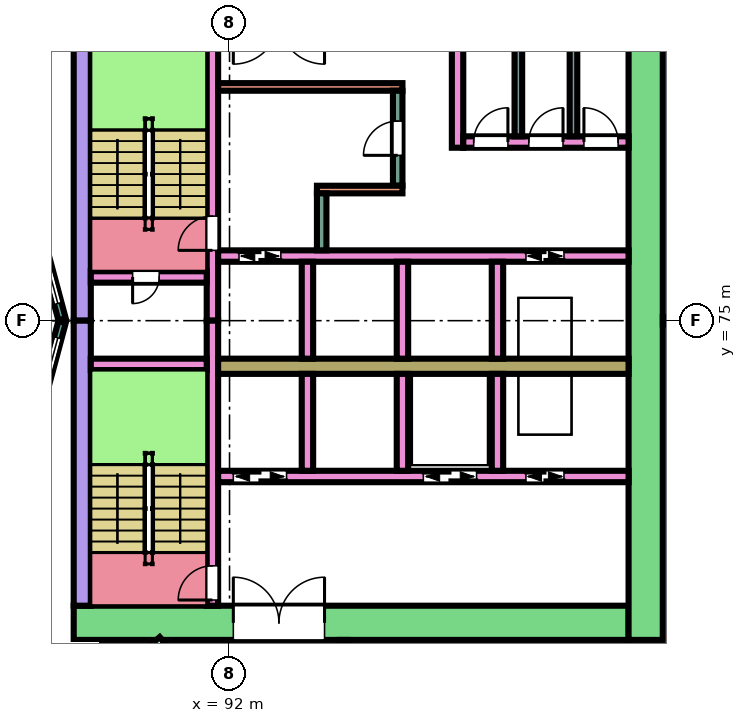
"""IFC4 building model, lengths in metres.
Left out: names, types, materials, properties, quantities, classifications, styles, units other than length and angle.
Written with IfcOpenShell. Run it as: python <this file> out.ifc"""

import sys

from ifc_helpers import new_model, si_unit, direction, frame, frame_2d, origin, place, context, subcontext, project, spatial, rectangle, extrude, element, fill, save


model = new_model("IFC4")
c1 = context("Model", 3, precision=1e-05, world=origin(), true_north=direction((0.0, 1.0)))
c2 = subcontext(c1, "Body", "Model", "MODEL_VIEW")
j1 = project(units=[si_unit("LENGTHUNIT", "METRE"), si_unit("PLANEANGLEUNIT", "RADIAN")], contexts=[c1])
p1 = place(None, origin())
s1 = spatial("IfcSite", under=j1, at=p1, CompositionType="ELEMENT")
p2 = place(p1, origin())
s2 = spatial("IfcBuilding", under=s1, at=p2, CompositionType="ELEMENT")
p3 = place(p2, frame((0.0, 0.0, 17.8)))
s3 = spatial("IfcBuildingStorey", under=s2, at=p3, CompositionType="ELEMENT", Elevation=17.8)
p4 = place(p3, frame((87.9, 67.05, 0.0), z_axis=(0.0, 0.0, 1.0), x_axis=(1.0, 0.0, 0.0)))
e1 = element("IfcWall", 1, at=p4, inside=s3, PredefinedType="SHEAR", context=c2, shape_type="SweptSolid", body=[
    extrude(rectangle(XDim=14.6, YDim=0.9, at=frame_2d((7.3, 0.0))), origin(), (0.0, 0.0, 1.0), 5.55),
])
p5 = place(p4, frame((4.2, 0.0, 0.0)))
e2 = element("IfcOpeningElement", 2, at=p5, cuts=e1, PredefinedType="OPENING", context=c2, shape_type="SweptSolid", body=[
    extrude(rectangle(XDim=2.4, YDim=2.4, at=frame_2d((1.2, 1.2))), frame((0.0, 0.46, 0.0), z_axis=(0.0, -1.0, 0.0), x_axis=(1.0, 0.0, 0.0)), (0.0, 0.0, 1.0), 0.92),
])
for number, where, z_axis, x_axis in (
    (3, (88.125, 75.0, 0.0), (0.0, 0.0, 1.0), (0.0, 1.0, 0.0)),
    (4, (88.125, 67.5, 0.0), (0.0, 0.0, 1.0), (0.0, 1.0, 0.0)),
):
    element("IfcWall", number, at=place(p3, frame(where, z_axis=z_axis, x_axis=x_axis)), inside=s3, PredefinedType="SHEAR", context=c2, shape_type="SweptSolid", body=[
        extrude(rectangle(XDim=7.5, YDim=0.45, at=frame_2d((3.75, 0.0))), origin(), (0.0, 0.0, 1.0), 5.55),
    ])
p6 = place(p3, frame((102.95, 66.6, 0.0), z_axis=(0.0, 0.0, 1.0), x_axis=(0.0, 1.0, 0.0)))
e5 = element("IfcWall", 5, at=p6, inside=s3, PredefinedType="SHEAR", context=c2, shape_type="SweptSolid", body=[
    extrude(rectangle(XDim=16.8, YDim=0.9, at=frame_2d((8.4, 0.0))), origin(), (0.0, 0.0, 1.0), 5.55),
])
p7 = place(p3, frame((91.55, 75.0, 0.0), z_axis=(0.0, 0.0, 1.0), x_axis=(0.0, 1.0, 0.0)))
e6 = element("IfcWall", 6, at=p7, inside=s3, PredefinedType="SHEAR", context=c2, shape_type="SweptSolid", body=[
    extrude(rectangle(XDim=7.5, YDim=0.3, at=frame_2d((3.75, 0.0))), origin(), (0.0, 0.0, 1.0), 5.55),
])
p8 = place(p7, frame((1.85, 0.0, 0.0)))
e7 = element("IfcOpeningElement", 7, at=p8, cuts=e6, PredefinedType="OPENING", context=c2, shape_type="SweptSolid", body=[
    extrude(rectangle(XDim=0.9, YDim=2.1, at=frame_2d((0.45, 1.05))), frame((0.0, 0.16, 0.0), z_axis=(0.0, -1.0, 0.0), x_axis=(1.0, 0.0, 0.0)), (0.0, 0.0, 1.0), 0.32),
])
p9 = place(p3, frame((91.55, 67.5, 0.0), z_axis=(0.0, 0.0, 1.0), x_axis=(0.0, 1.0, 0.0)))
e8 = element("IfcWall", 8, at=p9, inside=s3, PredefinedType="SHEAR", context=c2, shape_type="SweptSolid", body=[
    extrude(rectangle(XDim=7.5, YDim=0.3, at=frame_2d((3.75, 0.0))), origin(), (0.0, 0.0, 1.0), 5.55),
])
p10 = place(p9, frame((0.15, 0.0, 0.0)))
e9 = element("IfcOpeningElement", 9, at=p10, cuts=e8, PredefinedType="OPENING", context=c2, shape_type="SweptSolid", body=[
    extrude(rectangle(XDim=0.9, YDim=2.1, at=frame_2d((0.45, 1.05))), frame((0.0, 0.16, 0.0), z_axis=(0.0, -1.0, 0.0), x_axis=(1.0, 0.0, 0.0)), (0.0, 0.0, 1.0), 0.32),
])
p11 = place(p3, frame((88.35, 76.15, 0.0), z_axis=(0.0, 0.0, 1.0), x_axis=(1.0, 0.0, 0.0)))
e10 = element("IfcWall", 10, at=p11, inside=s3, PredefinedType="SHEAR", context=c2, shape_type="SweptSolid", body=[
    extrude(rectangle(XDim=3.05, YDim=0.3, at=frame_2d((1.525, 0.0))), origin(), (0.0, 0.0, 1.0), 5.55),
])
p12 = place(p11, frame((1.1, 0.0, 0.0)))
e11 = element("IfcOpeningElement", 11, at=p12, cuts=e10, PredefinedType="OPENING", context=c2, shape_type="SweptSolid", body=[
    extrude(rectangle(XDim=0.7, YDim=2.0, at=frame_2d((0.35, 1.0))), frame((0.0, 0.16, 0.0), z_axis=(0.0, -1.0, 0.0), x_axis=(1.0, 0.0, 0.0)), (0.0, 0.0, 1.0), 0.32),
])
p13 = place(p3, frame((88.35, 73.85, 0.0), z_axis=(0.0, 0.0, 1.0), x_axis=(1.0, 0.0, 0.0)))
e12 = element("IfcWall", 12, at=p13, inside=s3, PredefinedType="SHEAR", context=c2, shape_type="SweptSolid", body=[
    extrude(rectangle(XDim=3.05, YDim=0.3, at=frame_2d((1.525, 0.0))), origin(), (0.0, 0.0, 1.0), 5.55),
])
p14 = place(p3, frame((91.7, 76.7, 0.0), z_axis=(0.0, 0.0, 1.0), x_axis=(1.0, 0.0, 0.0)))
e13 = element("IfcWall", 13, at=p14, inside=s3, PredefinedType="SHEAR", context=c2, shape_type="SweptSolid", body=[
    extrude(rectangle(XDim=10.8, YDim=0.3, at=frame_2d((5.4, 0.0))), origin(), (0.0, 0.0, 1.0), 5.55),
])
p15 = place(p14, frame((0.55, 0.0, 0.0)))
e14 = element("IfcOpeningElement", 14, at=p15, cuts=e13, PredefinedType="OPENING", context=c2, shape_type="SweptSolid", body=[
    extrude(rectangle(XDim=1.1, YDim=2.1, at=frame_2d((0.55, 1.05))), frame((0.0, 0.16, 0.0), z_axis=(0.0, -1.0, 0.0), x_axis=(1.0, 0.0, 0.0)), (0.0, 0.0, 1.0), 0.32),
])
p16 = place(p14, frame((8.1, 0.0, 0.0)))
e15 = element("IfcOpeningElement", 15, at=p16, cuts=e13, PredefinedType="OPENING", context=c2, shape_type="SweptSolid", body=[
    extrude(rectangle(XDim=1.0, YDim=2.1, at=frame_2d((0.5, 1.05))), frame((0.0, 0.16, 0.0), z_axis=(0.0, -1.0, 0.0), x_axis=(1.0, 0.0, 0.0)), (0.0, 0.0, 1.0), 0.32),
])
p17 = place(p3, frame((91.7, 73.8, 0.0), z_axis=(0.0, 0.0, 1.0), x_axis=(1.0, 0.0, 0.0)))
e16 = element("IfcWall", 16, at=p17, inside=s3, PredefinedType="SHEAR", context=c2, shape_type="SweptSolid", body=[
    extrude(rectangle(XDim=10.8, YDim=0.4, at=frame_2d((5.4, 0.0))), origin(), (0.0, 0.0, 1.0), 5.55),
])
p18 = place(p3, frame((91.7, 70.9, 0.0), z_axis=(0.0, 0.0, 1.0), x_axis=(1.0, 0.0, 0.0)))
e17 = element("IfcWall", 17, at=p18, inside=s3, PredefinedType="SHEAR", context=c2, shape_type="SweptSolid", body=[
    extrude(rectangle(XDim=10.8, YDim=0.3, at=frame_2d((5.4, 0.0))), origin(), (0.0, 0.0, 1.0), 5.55),
])
p19 = place(p18, frame((0.4, 0.0, 0.0)))
e18 = element("IfcOpeningElement", 18, at=p19, cuts=e17, PredefinedType="OPENING", context=c2, shape_type="SweptSolid", body=[
    extrude(rectangle(XDim=1.4, YDim=2.1, at=frame_2d((0.7, 1.05))), frame((0.0, 0.16, 0.0), z_axis=(0.0, -1.0, 0.0), x_axis=(1.0, 0.0, 0.0)), (0.0, 0.0, 1.0), 0.32),
])
p20 = place(p18, frame((5.4, 0.0, 0.0)))
e19 = element("IfcOpeningElement", 19, at=p20, cuts=e17, PredefinedType="OPENING", context=c2, shape_type="SweptSolid", body=[
    extrude(rectangle(XDim=1.4, YDim=2.1, at=frame_2d((0.7, 1.05))), frame((0.0, 0.16, 0.0), z_axis=(0.0, -1.0, 0.0), x_axis=(1.0, 0.0, 0.0)), (0.0, 0.0, 1.0), 0.32),
])
p21 = place(p18, frame((8.1, 0.0, 0.0)))
e20 = element("IfcOpeningElement", 20, at=p21, cuts=e17, PredefinedType="OPENING", context=c2, shape_type="SweptSolid", body=[
    extrude(rectangle(XDim=1.0, YDim=2.1, at=frame_2d((0.5, 1.05))), frame((0.0, 0.16, 0.0), z_axis=(0.0, -1.0, 0.0), x_axis=(1.0, 0.0, 0.0)), (0.0, 0.0, 1.0), 0.32),
])
for number, where, z_axis, x_axis in (
    (21, (94.05, 74.0, 0.0), (0.0, 0.0, 1.0), (0.0, 1.0, 0.0)),
    (22, (96.55, 74.0, 0.0), (0.0, 0.0, 1.0), (0.0, 1.0, 0.0)),
    (23, (99.05, 74.0, 0.0), (0.0, 0.0, 1.0), (0.0, 1.0, 0.0)),
    (24, (94.05, 71.05, 0.0), (0.0, 0.0, 1.0), (0.0, 1.0, 0.0)),
    (25, (96.55, 71.05, 0.0), (0.0, 0.0, 1.0), (0.0, 1.0, 0.0)),
    (26, (99.05, 71.05, 0.0), (0.0, 0.0, 1.0), (0.0, 1.0, 0.0)),
):
    element("IfcWall", number, at=place(p3, frame(where, z_axis=z_axis, x_axis=x_axis)), inside=s3, PredefinedType="SHEAR", context=c2, shape_type="SweptSolid", body=[
        extrude(rectangle(XDim=2.55, YDim=0.3, at=frame_2d((1.275, 0.0))), origin(), (0.0, 0.0, 1.0), 5.55),
    ])
p22 = place(p3, frame((91.7, 81.15, 0.0), z_axis=(0.0, 0.0, 1.0), x_axis=(1.0, 0.0, 0.0)))
e27 = element("IfcWall", 27, at=p22, inside=s3, PredefinedType="SHEAR", context=c2, shape_type="SweptSolid", body=[
    extrude(rectangle(XDim=4.85, YDim=0.2, at=frame_2d((2.425, 0.0))), origin(), (0.0, 0.0, 1.0), 5.55),
])
p23 = place(p3, frame((96.425, 78.55, 0.0), z_axis=(0.0, 0.0, 1.0), x_axis=(0.0, 1.0, 0.0)))
e28 = element("IfcWall", 28, at=p23, inside=s3, PredefinedType="SHEAR", context=c2, shape_type="SweptSolid", body=[
    extrude(rectangle(XDim=2.5, YDim=0.25, at=frame_2d((1.25, 0.0))), origin(), (0.0, 0.0, 1.0), 5.55),
])
p24 = place(p23, frame((0.8, 0.0, 0.0)))
e29 = element("IfcOpeningElement", 29, at=p24, cuts=e28, PredefinedType="OPENING", context=c2, shape_type="SweptSolid", body=[
    extrude(rectangle(XDim=0.9, YDim=2.1, at=frame_2d((0.45, 1.05))), frame((0.0, 0.135, 0.0), z_axis=(0.0, -1.0, 0.0), x_axis=(1.0, 0.0, 0.0)), (0.0, 0.0, 1.0), 0.27),
])
p25 = place(p3, frame((94.3, 78.45, 0.0), z_axis=(0.0, 0.0, 1.0), x_axis=(1.0, 0.0, 0.0)))
e30 = element("IfcWall", 30, at=p25, inside=s3, PredefinedType="SHEAR", context=c2, shape_type="SweptSolid", body=[
    extrude(rectangle(XDim=2.25, YDim=0.2, at=frame_2d((1.125, 0.0))), origin(), (0.0, 0.0, 1.0), 5.55),
])
p26 = place(p3, frame((94.425, 76.85, 0.0), z_axis=(0.0, 0.0, 1.0), x_axis=(0.0, 1.0, 0.0)))
e31 = element("IfcWall", 31, at=p26, inside=s3, PredefinedType="SHEAR", context=c2, shape_type="SweptSolid", body=[
    extrude(rectangle(XDim=1.5, YDim=0.25, at=frame_2d((0.75, 0.0))), origin(), (0.0, 0.0, 1.0), 5.55),
])
p27 = place(p3, frame((98.0, 79.55, 0.0), z_axis=(0.0, 0.0, 1.0), x_axis=(0.0, 1.0, 0.0)))
e32 = element("IfcWall", 32, at=p27, inside=s3, PredefinedType="SHEAR", context=c2, shape_type="SweptSolid", body=[
    extrude(rectangle(XDim=2.95, YDim=0.3, at=frame_2d((1.475, 0.0))), origin(), (0.0, 0.0, 1.0), 5.55),
])
p28 = place(p3, frame((98.15, 79.7, 0.0), z_axis=(0.0, 0.0, 1.0), x_axis=(1.0, 0.0, 0.0)))
e33 = element("IfcWall", 33, at=p28, inside=s3, PredefinedType="SHEAR", context=c2, shape_type="SweptSolid", body=[
    extrude(rectangle(XDim=4.35, YDim=0.3, at=frame_2d((2.175, 0.0))), origin(), (0.0, 0.0, 1.0), 5.55),
])
p29 = place(p28, frame((0.275, 0.0, 0.0)))
e34 = element("IfcOpeningElement", 34, at=p29, cuts=e33, PredefinedType="OPENING", context=c2, shape_type="SweptSolid", body=[
    extrude(rectangle(XDim=0.9, YDim=2.1, at=frame_2d((0.45, 1.05))), frame((0.0, 0.16, 0.0), z_axis=(0.0, -1.0, 0.0), x_axis=(1.0, 0.0, 0.0)), (0.0, 0.0, 1.0), 0.32),
])
p30 = place(p28, frame((1.725, 0.0, 0.0)))
e35 = element("IfcOpeningElement", 35, at=p30, cuts=e33, PredefinedType="OPENING", context=c2, shape_type="SweptSolid", body=[
    extrude(rectangle(XDim=0.9, YDim=2.1, at=frame_2d((0.45, 1.05))), frame((0.0, 0.16, 0.0), z_axis=(0.0, -1.0, 0.0), x_axis=(1.0, 0.0, 0.0)), (0.0, 0.0, 1.0), 0.32),
])
p31 = place(p28, frame((3.175, 0.0, 0.0)))
e36 = element("IfcOpeningElement", 36, at=p31, cuts=e33, PredefinedType="OPENING", context=c2, shape_type="SweptSolid", body=[
    extrude(rectangle(XDim=0.9, YDim=2.1, at=frame_2d((0.45, 1.05))), frame((0.0, 0.16, 0.0), z_axis=(0.0, -1.0, 0.0), x_axis=(1.0, 0.0, 0.0)), (0.0, 0.0, 1.0), 0.32),
])
p32 = place(p3, frame((87.604, 75.0, 0.0), z_axis=(0.0, 0.0, 1.0), x_axis=(-0.258789828301, 0.965933654434, 0.0)))
e37 = element("IfcWall", 37, at=p32, inside=s3, PredefinedType="NOTDEFINED", context=c2, shape_type="SweptSolid", body=[
    extrude(rectangle(XDim=3.936, YDim=0.2, at=frame_2d((1.968, 0.0))), origin(), (0.0, 0.0, 1.0), 6.0),
])
p33 = place(p32, frame((0.468, 0.0, 0.9)))
e38 = element("IfcOpeningElement", 38, at=p33, cuts=e37, PredefinedType="OPENING", context=c2, shape_type="SweptSolid", body=[
    extrude(rectangle(XDim=3.0, YDim=2.3, at=frame_2d((1.5, 1.15))), frame((0.0, 0.11, 0.0), z_axis=(0.0, -1.0, 0.0), x_axis=(1.0, 0.0, 0.0)), (0.0, 0.0, 1.0), 0.22),
])
p34 = place(p3, frame((86.585, 71.198, 0.0), z_axis=(0.0, 0.0, 1.0), x_axis=(0.258789828301, 0.965933654434, 0.0)))
e39 = element("IfcWall", 39, at=p34, inside=s3, PredefinedType="NOTDEFINED", context=c2, shape_type="SweptSolid", body=[
    extrude(rectangle(XDim=3.936, YDim=0.2, at=frame_2d((1.968, 0.0))), origin(), (0.0, 0.0, 1.0), 6.0),
])
p35 = place(p34, frame((0.468, 0.0, 0.9)))
e40 = element("IfcOpeningElement", 40, at=p35, cuts=e39, PredefinedType="OPENING", context=c2, shape_type="SweptSolid", body=[
    extrude(rectangle(XDim=3.0, YDim=2.3, at=frame_2d((1.5, 1.15))), frame((0.0, 0.11, 0.0), z_axis=(0.0, -1.0, 0.0), x_axis=(1.0, 0.0, 0.0)), (0.0, 0.0, 1.0), 0.22),
])
p36 = place(p3, frame((86.685, 63.551, 0.0), z_axis=(0.0, 0.0, 1.0), x_axis=(0.758049900748, 0.652196556244, 0.0)))
e41 = element("IfcWall", 41, at=p36, inside=s3, PredefinedType="PARTITIONING", context=c2, shape_type="SweptSolid", body=[
    extrude(rectangle(XDim=4.675, YDim=0.2, at=frame_2d((2.337, 0.0))), origin(), (0.0, 0.0, 1.0), 5.55),
])
p37 = place(p36, frame((1.887, 0.0, 0.0)))
e42 = element("IfcOpeningElement", 42, at=p37, cuts=e41, PredefinedType="OPENING", context=c2, shape_type="SweptSolid", body=[
    extrude(rectangle(XDim=0.9, YDim=2.1, at=frame_2d((0.45, 1.05))), frame((0.0, 0.11, 0.0), z_axis=(0.0, -1.0, 0.0), x_axis=(1.0, 0.0, 0.0)), (0.0, 0.0, 1.0), 0.22),
])
p38 = place(p3, frame((95.0, 65.1, 0.0), z_axis=(0.0, 0.0, 1.0), x_axis=(0.0, 1.0, 0.0)))
e43 = element("IfcWall", 43, at=p38, inside=s3, PredefinedType="PARTITIONING", context=c2, shape_type="SweptSolid", body=[
    extrude(rectangle(XDim=1.499, YDim=0.2, at=frame_2d((0.75, 0.0))), origin(), (0.0, 0.0, 1.0), 5.55),
])
p39 = place(p38, frame((0.3, 0.0, 0.0)))
e44 = element("IfcOpeningElement", 44, at=p39, cuts=e43, PredefinedType="OPENING", context=c2, shape_type="SweptSolid", body=[
    extrude(rectangle(XDim=0.9, YDim=2.1, at=frame_2d((0.45, 1.05))), frame((0.0, 0.11, 0.0), z_axis=(0.0, -1.0, 0.0), x_axis=(1.0, 0.0, 0.0)), (0.0, 0.0, 1.0), 0.22),
])
p40 = place(p3, frame((103.401, 75.0, 0.0), z_axis=(0.0, 0.0, 1.0), x_axis=(1.0, 0.0, 0.0)))
e45 = element("IfcWall", 45, at=p40, inside=s3, PredefinedType="PARTITIONING", context=c2, shape_type="SweptSolid", body=[
    extrude(rectangle(XDim=8.896, YDim=0.2, at=frame_2d((4.448, 0.0))), origin(), (0.0, 0.0, 1.0), 4.55),
])
for number, where, z_axis, x_axis in (
    (46, (99.6, 79.85, 0.0), (0.0, 0.0, 1.0), (0.0, 1.0, 0.0)),
    (47, (101.05, 79.85, 0.0), (0.0, 0.0, 1.0), (0.0, 1.0, 0.0)),
):
    element("IfcWall", number, at=place(p3, frame(where, z_axis=z_axis, x_axis=x_axis)), inside=s3, PredefinedType="PARTITIONING", context=c2, shape_type="SweptSolid", body=[
        extrude(rectangle(XDim=2.65, YDim=0.2, at=frame_2d((1.325, 0.0))), origin(), (0.0, 0.0, 1.0), 5.55),
    ])
p41 = place(p33, origin())
e48 = element("IfcWindow", 48, at=p41, inside=s3, PartitioningType="SINGLE_PANEL", PredefinedType="WINDOW", context=c2, shape_type="SweptSolid", body=[
    extrude(rectangle(XDim=3.0, YDim=2.3, at=frame_2d((1.5, 1.15))), frame((0.0, 0.03, 0.0), z_axis=(0.0, -1.0, 0.0), x_axis=(1.0, 0.0, 0.0)), (0.0, 0.0, 1.0), 0.06),
])
fill(e38, e48)
p42 = place(p35, origin())
e49 = element("IfcWindow", 49, at=p42, inside=s3, PartitioningType="SINGLE_PANEL", PredefinedType="WINDOW", context=c2, shape_type="SweptSolid", body=[
    extrude(rectangle(XDim=3.0, YDim=2.3, at=frame_2d((1.5, 1.15))), frame((0.0, 0.03, 0.0), z_axis=(0.0, -1.0, 0.0), x_axis=(1.0, 0.0, 0.0)), (0.0, 0.0, 1.0), 0.06),
])
fill(e40, e49)
p43 = place(p12, frame((0.7, 0.0, 0.0), z_axis=(0.0, 0.0, 1.0), x_axis=(-1.0, 0.0, 0.0)))
e50 = element("IfcDoor", 50, at=p43, inside=s3, OperationType="SINGLE_SWING_RIGHT", PredefinedType="DOOR", context=c2, shape_type="SweptSolid", body=[
    extrude(rectangle(XDim=0.7, YDim=2.0, at=frame_2d((0.35, 1.0))), frame((0.0, 0.025, 0.0), z_axis=(0.0, -1.0, 0.0), x_axis=(1.0, 0.0, 0.0)), (0.0, 0.0, 1.0), 0.05),
])
fill(e11, e50)
p44 = place(p8, origin())
e51 = element("IfcDoor", 51, at=p44, inside=s3, OperationType="SINGLE_SWING_LEFT", PredefinedType="DOOR", context=c2, shape_type="SweptSolid", body=[
    extrude(rectangle(XDim=0.9, YDim=2.1, at=frame_2d((0.45, 1.05))), frame((0.0, 0.025, 0.0), z_axis=(0.0, -1.0, 0.0), x_axis=(1.0, 0.0, 0.0)), (0.0, 0.0, 1.0), 0.05),
])
fill(e7, e51)
p45 = place(p10, origin())
e52 = element("IfcDoor", 52, at=p45, inside=s3, OperationType="SINGLE_SWING_LEFT", PredefinedType="DOOR", context=c2, shape_type="SweptSolid", body=[
    extrude(rectangle(XDim=0.9, YDim=2.1, at=frame_2d((0.45, 1.05))), frame((0.0, 0.025, 0.0), z_axis=(0.0, -1.0, 0.0), x_axis=(1.0, 0.0, 0.0)), (0.0, 0.0, 1.0), 0.05),
])
fill(e9, e52)
p46 = place(p15, origin())
e53 = element("IfcDoor", 53, at=p46, inside=s3, OperationType="DOUBLE_DOOR_SLIDING", PredefinedType="DOOR", context=c2, shape_type="SweptSolid", body=[
    extrude(rectangle(XDim=1.1, YDim=2.1, at=frame_2d((0.55, 1.05))), frame((0.0, 0.025, 0.0), z_axis=(0.0, -1.0, 0.0), x_axis=(1.0, 0.0, 0.0)), (0.0, 0.0, 1.0), 0.05),
])
fill(e14, e53)
p47 = place(p16, origin())
e54 = element("IfcDoor", 54, at=p47, inside=s3, OperationType="DOUBLE_DOOR_SLIDING", PredefinedType="DOOR", context=c2, shape_type="SweptSolid", body=[
    extrude(rectangle(XDim=1.0, YDim=2.1, at=frame_2d((0.5, 1.05))), frame((0.0, 0.025, 0.0), z_axis=(0.0, -1.0, 0.0), x_axis=(1.0, 0.0, 0.0)), (0.0, 0.0, 1.0), 0.05),
])
fill(e15, e54)
p48 = place(p19, origin())
e55 = element("IfcDoor", 55, at=p48, inside=s3, OperationType="DOUBLE_DOOR_SLIDING", PredefinedType="DOOR", context=c2, shape_type="SweptSolid", body=[
    extrude(rectangle(XDim=1.4, YDim=2.1, at=frame_2d((0.7, 1.05))), frame((0.0, 0.025, 0.0), z_axis=(0.0, -1.0, 0.0), x_axis=(1.0, 0.0, 0.0)), (0.0, 0.0, 1.0), 0.05),
])
fill(e18, e55)
p49 = place(p20, origin())
e56 = element("IfcDoor", 56, at=p49, inside=s3, OperationType="DOUBLE_DOOR_SLIDING", PredefinedType="DOOR", context=c2, shape_type="SweptSolid", body=[
    extrude(rectangle(XDim=1.4, YDim=2.1, at=frame_2d((0.7, 1.05))), frame((0.0, 0.025, 0.0), z_axis=(0.0, -1.0, 0.0), x_axis=(1.0, 0.0, 0.0)), (0.0, 0.0, 1.0), 0.05),
])
fill(e19, e56)
p50 = place(p21, origin())
e57 = element("IfcDoor", 57, at=p50, inside=s3, OperationType="DOUBLE_DOOR_SLIDING", PredefinedType="DOOR", context=c2, shape_type="SweptSolid", body=[
    extrude(rectangle(XDim=1.0, YDim=2.1, at=frame_2d((0.5, 1.05))), frame((0.0, 0.025, 0.0), z_axis=(0.0, -1.0, 0.0), x_axis=(1.0, 0.0, 0.0)), (0.0, 0.0, 1.0), 0.05),
])
fill(e20, e57)
p51 = place(p24, origin())
e58 = element("IfcDoor", 58, at=p51, inside=s3, OperationType="SINGLE_SWING_LEFT", PredefinedType="DOOR", context=c2, shape_type="SweptSolid", body=[
    extrude(rectangle(XDim=0.9, YDim=2.1, at=frame_2d((0.45, 1.05))), frame((0.0, 0.025, 0.0), z_axis=(0.0, -1.0, 0.0), x_axis=(1.0, 0.0, 0.0)), (0.0, 0.0, 1.0), 0.05),
])
fill(e29, e58)
p52 = place(p29, origin())
e59 = element("IfcDoor", 59, at=p52, inside=s3, OperationType="SINGLE_SWING_RIGHT", PredefinedType="DOOR", context=c2, shape_type="SweptSolid", body=[
    extrude(rectangle(XDim=0.9, YDim=2.1, at=frame_2d((0.45, 1.05))), frame((0.0, 0.025, 0.0), z_axis=(0.0, -1.0, 0.0), x_axis=(1.0, 0.0, 0.0)), (0.0, 0.0, 1.0), 0.05),
])
fill(e34, e59)
p53 = place(p30, origin())
e60 = element("IfcDoor", 60, at=p53, inside=s3, OperationType="SINGLE_SWING_RIGHT", PredefinedType="DOOR", context=c2, shape_type="SweptSolid", body=[
    extrude(rectangle(XDim=0.9, YDim=2.1, at=frame_2d((0.45, 1.05))), frame((0.0, 0.025, 0.0), z_axis=(0.0, -1.0, 0.0), x_axis=(1.0, 0.0, 0.0)), (0.0, 0.0, 1.0), 0.05),
])
fill(e35, e60)
p54 = place(p31, origin())
e61 = element("IfcDoor", 61, at=p54, inside=s3, OperationType="SINGLE_SWING_LEFT", PredefinedType="DOOR", context=c2, shape_type="SweptSolid", body=[
    extrude(rectangle(XDim=0.9, YDim=2.1, at=frame_2d((0.45, 1.05))), frame((0.0, 0.025, 0.0), z_axis=(0.0, -1.0, 0.0), x_axis=(1.0, 0.0, 0.0)), (0.0, 0.0, 1.0), 0.05),
])
fill(e36, e61)
p55 = place(p5, origin())
e62 = element("IfcDoor", 62, at=p55, inside=s3, OperationType="DOUBLE_DOOR_SINGLE_SWING", PredefinedType="DOOR", context=c2, shape_type="SweptSolid", body=[
    extrude(rectangle(XDim=2.4, YDim=2.4, at=frame_2d((1.2, 1.2))), frame((0.0, 0.025, 0.0), z_axis=(0.0, -1.0, 0.0), x_axis=(1.0, 0.0, 0.0)), (0.0, 0.0, 1.0), 0.05),
])
fill(e2, e62)
save(model, sys.argv[1])
